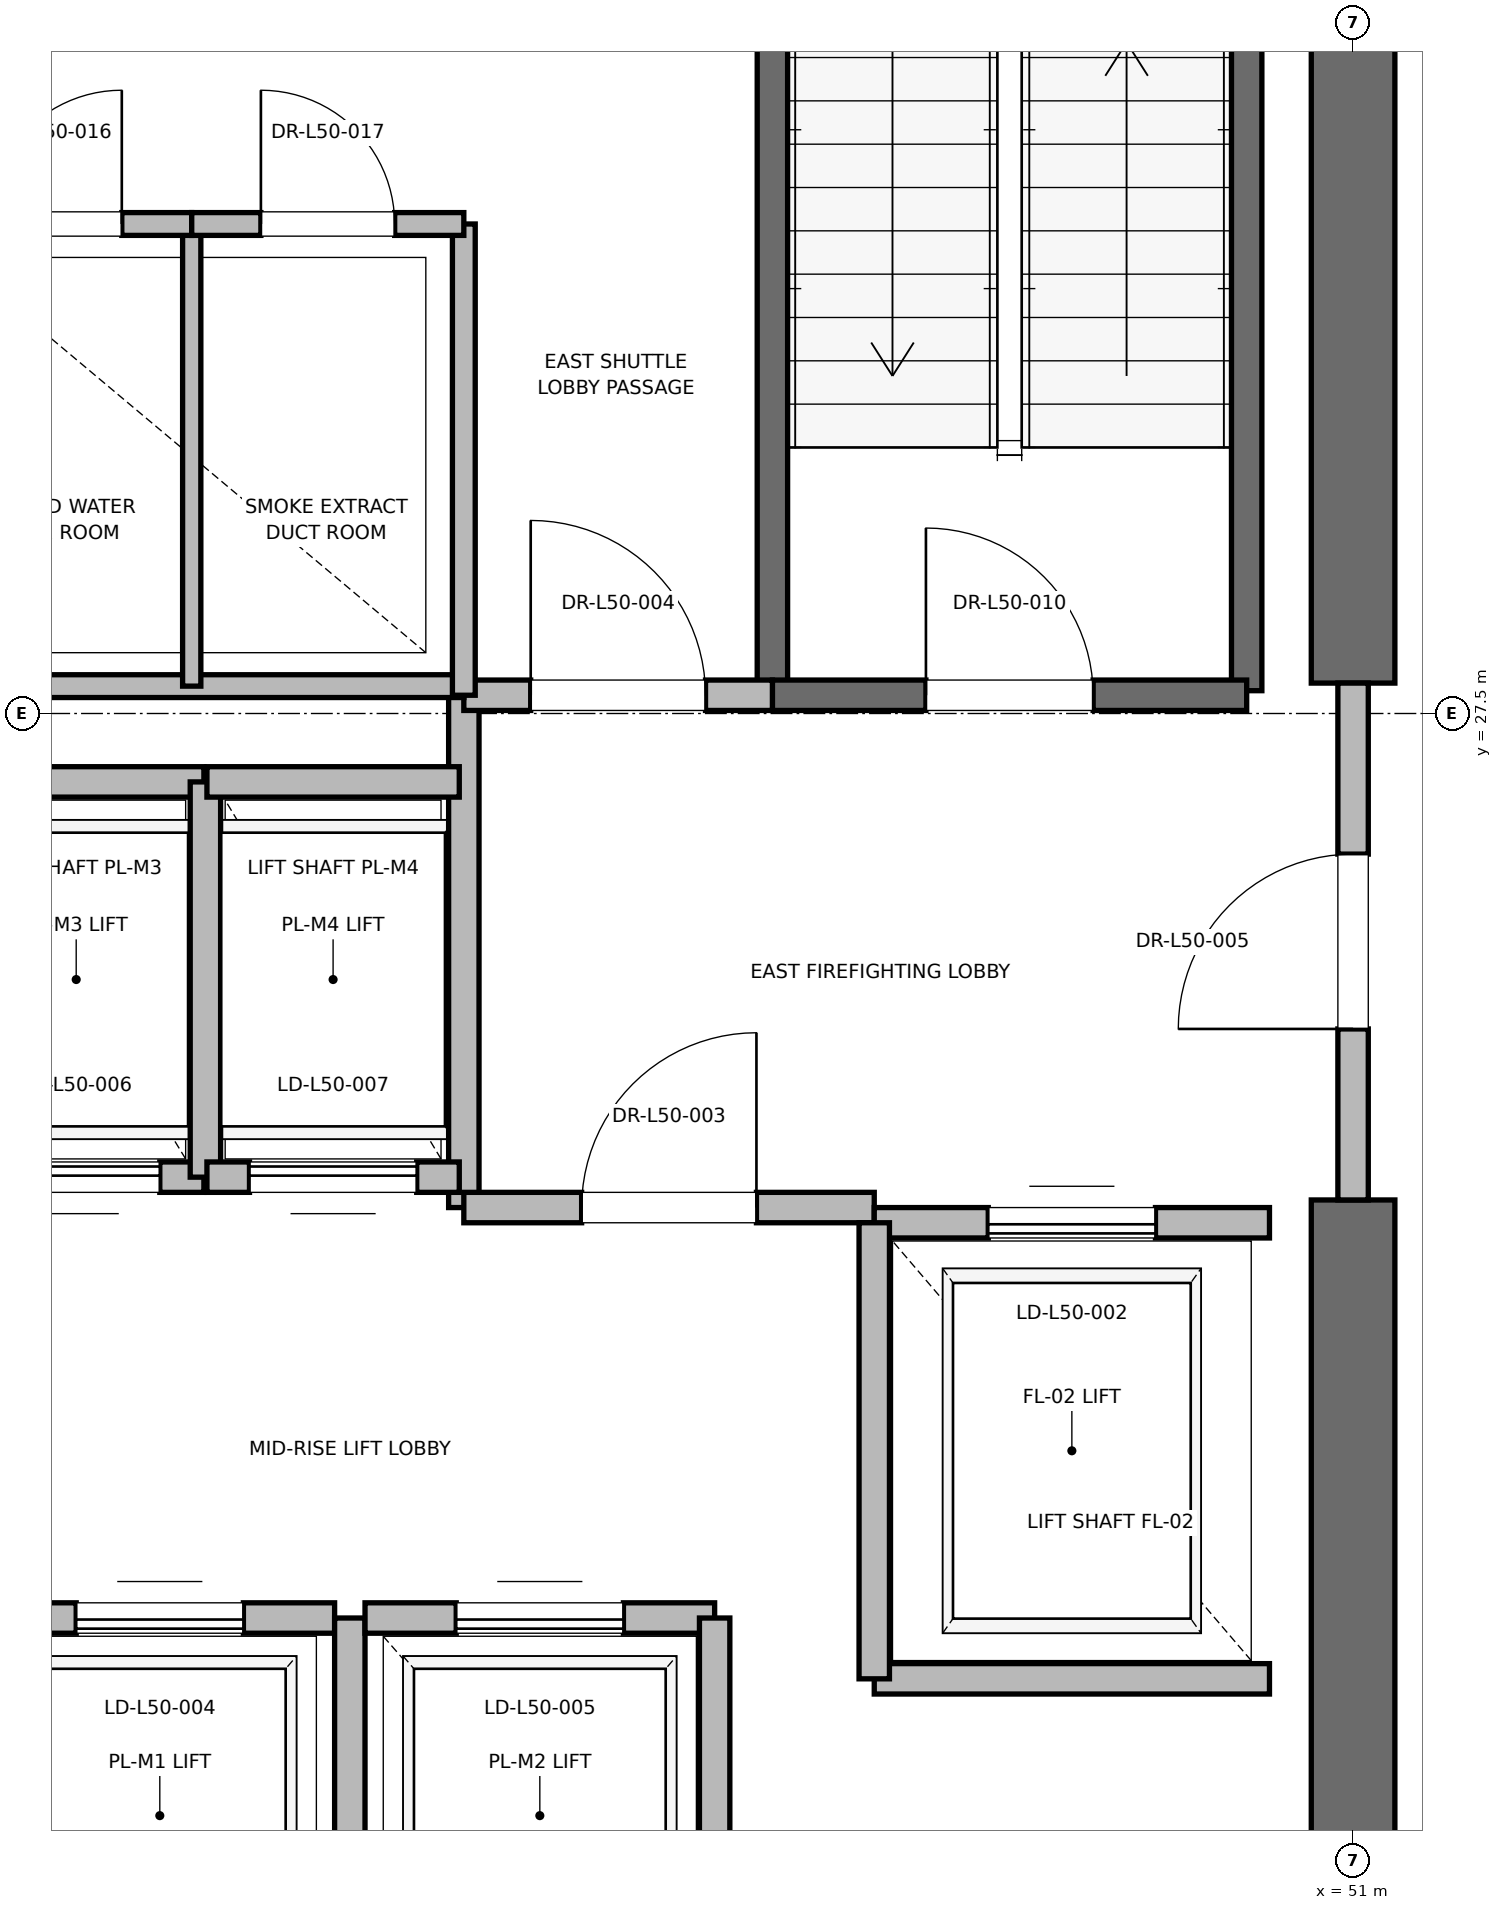
"""IFC4 building model, lengths in metres.
Left out: names, types, materials, properties, quantities, classifications, styles, units other than length and angle.
Written with IfcOpenShell. Run it as: python <this file> out.ifc"""

import sys

from ifc_helpers import new_model, si_unit, direction, frame, frame_2d, origin, place, context, subcontext, project, spatial, rectangle, extrude, element, fill, save


model = new_model("IFC4")
c1 = context("Model", 3, precision=1e-05, world=origin(), true_north=direction((0.0, 1.0)))
c2 = subcontext(c1, "Body", "Model", "MODEL_VIEW")
j1 = project(units=[si_unit("LENGTHUNIT", "METRE"), si_unit("PLANEANGLEUNIT", "RADIAN")], contexts=[c1])
p1 = place(None, origin())
s1 = spatial("IfcSite", under=j1, at=p1, CompositionType="ELEMENT")
p2 = place(p1, origin())
s2 = spatial("IfcBuilding", under=s1, at=p2, CompositionType="ELEMENT")
p3 = place(p2, frame((0.0, 0.0, 217.2)))
s3 = spatial("IfcBuildingStorey", under=s2, at=p3, CompositionType="ELEMENT", Elevation=217.2)
p4 = place(p3, frame((51.0, 18.5, 0.0), z_axis=(0.0, 0.0, 1.0), x_axis=(0.0, 1.0, 0.0)))
e1 = element("IfcWall", 1, at=p4, inside=s3, PredefinedType="SHEAR", context=c2, shape_type="SweptSolid", body=[
    extrude(rectangle(XDim=5.8, YDim=0.55, at=frame_2d((2.9, 0.0))), origin(), (0.0, 0.0, 1.0), 3.775),
])
p5 = place(p3, frame((51.0, 27.7, 0.0), z_axis=(0.0, 0.0, 1.0), x_axis=(0.0, 1.0, 0.0)))
e2 = element("IfcWall", 2, at=p5, inside=s3, PredefinedType="SHEAR", context=c2, shape_type="SweptSolid", body=[
    extrude(rectangle(XDim=8.8, YDim=0.55, at=frame_2d((4.4, 0.0))), origin(), (0.0, 0.0, 1.0), 3.775),
])
p6 = place(p3, frame((50.3, 27.65, 0.0), z_axis=(0.0, 0.0, 1.0), x_axis=(0.0, 1.0, 0.0)))
e3 = element("IfcWall", 3, at=p6, inside=s3, PredefinedType="SOLIDWALL", context=c2, shape_type="SweptSolid", body=[
    extrude(rectangle(XDim=8.15, YDim=0.2, at=frame_2d((4.075, 0.0))), origin(), (0.0, 0.0, 1.0), 3.775),
])
p7 = place(p3, frame((47.18, 27.62, 0.0), z_axis=(0.0, 0.0, 1.0), x_axis=(0.0, 1.0, 0.0)))
e4 = element("IfcWall", 4, at=p7, inside=s3, PredefinedType="SOLIDWALL", context=c2, shape_type="SweptSolid", body=[
    extrude(rectangle(XDim=8.18, YDim=0.2, at=frame_2d((4.09, 0.0))), origin(), (0.0, 0.0, 1.0), 3.775),
])
p8 = place(p3, frame((47.18, 27.62, 0.0), z_axis=(0.0, 0.0, 1.0), x_axis=(1.0, 0.0, 0.0)))
e5 = element("IfcWall", 5, at=p8, inside=s3, PredefinedType="SOLIDWALL", context=c2, shape_type="SweptSolid", body=[
    extrude(rectangle(XDim=3.12, YDim=0.2, at=frame_2d((1.56, 0.0))), origin(), (0.0, 0.0, 1.0), 3.775),
])
p9 = place(p8, frame((1.01, 0.0, 0.0)))
e6 = element("IfcOpeningElement", 6, at=p9, cuts=e5, PredefinedType="OPENING", context=c2, shape_type="SweptSolid", body=[
    extrude(rectangle(XDim=1.1, YDim=2.15, at=frame_2d((0.55, 1.075))), frame((0.0, 0.1, 0.0), z_axis=(0.0, -1.0, 0.0), x_axis=(1.0, 0.0, 0.0)), (0.0, 0.0, 1.0), 0.2),
])
p10 = place(p3, frame((45.15, 24.25, 0.0), z_axis=(0.0, 0.0, 1.0), x_axis=(0.0, 1.0, 0.0)))
e7 = element("IfcWall", 7, at=p10, inside=s3, PredefinedType="PARTITIONING", context=c2, shape_type="SweptSolid", body=[
    extrude(rectangle(XDim=3.37, YDim=0.2, at=frame_2d((1.685, 0.0))), origin(), (0.0, 0.0, 1.0), 3.775),
])
p11 = place(p3, frame((45.15, 24.25, 0.0), z_axis=(0.0, 0.0, 1.0), x_axis=(1.0, 0.0, 0.0)))
e8 = element("IfcWall", 8, at=p11, inside=s3, PredefinedType="PARTITIONING", context=c2, shape_type="SweptSolid", body=[
    extrude(rectangle(XDim=2.7, YDim=0.2, at=frame_2d((1.35, 0.0))), origin(), (0.0, 0.0, 1.0), 3.775),
])
p12 = place(p11, frame((0.775, 0.0, 0.0)))
e9 = element("IfcOpeningElement", 9, at=p12, cuts=e8, PredefinedType="OPENING", context=c2, shape_type="SweptSolid", body=[
    extrude(rectangle(XDim=1.15, YDim=2.2, at=frame_2d((0.575, 1.1))), frame((0.0, 0.1, 0.0), z_axis=(0.0, -1.0, 0.0), x_axis=(1.0, 0.0, 0.0)), (0.0, 0.0, 1.0), 0.2),
])
p13 = place(p3, frame((45.15, 27.62, 0.0), z_axis=(0.0, 0.0, 1.0), x_axis=(1.0, 0.0, 0.0)))
e10 = element("IfcWall", 10, at=p13, inside=s3, PredefinedType="PARTITIONING", context=c2, shape_type="SweptSolid", body=[
    extrude(rectangle(XDim=2.03, YDim=0.2, at=frame_2d((1.015, 0.0))), origin(), (0.0, 0.0, 1.0), 3.775),
])
p14 = place(p13, frame((0.44, 0.0, 0.0)))
e11 = element("IfcOpeningElement", 11, at=p14, cuts=e10, PredefinedType="OPENING", context=c2, shape_type="SweptSolid", body=[
    extrude(rectangle(XDim=1.15, YDim=2.2, at=frame_2d((0.575, 1.1))), frame((0.0, 0.1, 0.0), z_axis=(0.0, -1.0, 0.0), x_axis=(1.0, 0.0, 0.0)), (0.0, 0.0, 1.0), 0.2),
])
p15 = place(p3, frame((51.0, 24.3, 0.0), z_axis=(0.0, 0.0, 1.0), x_axis=(0.0, 1.0, 0.0)))
e12 = element("IfcWall", 12, at=p15, inside=s3, PredefinedType="PARTITIONING", context=c2, shape_type="SweptSolid", body=[
    extrude(rectangle(XDim=3.4, YDim=0.2, at=frame_2d((1.7, 0.0))), origin(), (0.0, 0.0, 1.0), 2.755),
])
p16 = place(p15, frame((1.125, 0.0, 0.0)))
e13 = element("IfcOpeningElement", 13, at=p16, cuts=e12, PredefinedType="OPENING", context=c2, shape_type="SweptSolid", body=[
    extrude(rectangle(XDim=1.15, YDim=2.2, at=frame_2d((0.575, 1.1))), frame((0.0, 0.1, 0.0), z_axis=(0.0, -1.0, 0.0), x_axis=(1.0, 0.0, 0.0)), (0.0, 0.0, 1.0), 0.2),
])
p17 = place(p3, frame((47.85, 21.15, 0.0), z_axis=(0.0, 0.0, 1.0), x_axis=(1.0, 0.0, 0.0)))
e14 = element("IfcWall", 14, at=p17, inside=s3, PredefinedType="SOLIDWALL", context=c2, shape_type="SweptSolid", body=[
    extrude(rectangle(XDim=2.6, YDim=0.2, at=frame_2d((1.3, 0.0))), origin(), (0.0, 0.0, 1.0), 3.775),
])
p18 = place(p3, frame((50.45, 24.15, 0.0), z_axis=(0.0, 0.0, 1.0), x_axis=(-1.0, 0.0, 0.0)))
e15 = element("IfcWall", 15, at=p18, inside=s3, PredefinedType="SOLIDWALL", context=c2, shape_type="SweptSolid", body=[
    extrude(rectangle(XDim=2.6, YDim=0.2, at=frame_2d((1.3, 0.0))), origin(), (0.0, 0.0, 1.0), 2.755),
])
p19 = place(p18, frame((0.75, 0.0, 0.0)))
e16 = element("IfcOpeningElement", 16, at=p19, cuts=e15, PredefinedType="OPENING", context=c2, shape_type="SweptSolid", body=[
    extrude(rectangle(XDim=1.1, YDim=2.2, at=frame_2d((0.55, 1.1))), frame((0.0, 0.1, 0.0), z_axis=(0.0, -1.0, 0.0), x_axis=(1.0, 0.0, 0.0)), (0.0, 0.0, 1.0), 0.2),
])
p20 = place(p3, frame((47.85, 24.15, 0.0), z_axis=(0.0, 0.0, 1.0), x_axis=(0.0, -1.0, 0.0)))
e17 = element("IfcWall", 17, at=p20, inside=s3, PredefinedType="SOLIDWALL", context=c2, shape_type="SweptSolid", body=[
    extrude(rectangle(XDim=3.0, YDim=0.2, at=frame_2d((1.5, 0.0))), origin(), (0.0, 0.0, 1.0), 3.775),
])
p21 = place(p3, frame((44.3, 21.55, 0.0), z_axis=(0.0, 0.0, 1.0), x_axis=(-1.0, 0.0, 0.0)))
e18 = element("IfcWall", 18, at=p21, inside=s3, PredefinedType="SOLIDWALL", context=c2, shape_type="SweptSolid", body=[
    extrude(rectangle(XDim=2.3, YDim=0.2, at=frame_2d((1.15, 0.0))), origin(), (0.0, 0.0, 1.0), 3.775),
])
p22 = place(p21, frame((0.6, 0.0, 0.0)))
e19 = element("IfcOpeningElement", 19, at=p22, cuts=e18, PredefinedType="OPENING", context=c2, shape_type="SweptSolid", body=[
    extrude(rectangle(XDim=1.1, YDim=2.2, at=frame_2d((0.55, 1.1))), frame((0.0, 0.1, 0.0), z_axis=(0.0, -1.0, 0.0), x_axis=(1.0, 0.0, 0.0)), (0.0, 0.0, 1.0), 0.2),
])
p23 = place(p3, frame((44.4, 18.95, 0.0), z_axis=(0.0, 0.0, 1.0), x_axis=(0.0, 1.0, 0.0)))
e20 = element("IfcWall", 20, at=p23, inside=s3, PredefinedType="SOLIDWALL", context=c2, shape_type="SweptSolid", body=[
    extrude(rectangle(XDim=2.6, YDim=0.2, at=frame_2d((1.3, 0.0))), origin(), (0.0, 0.0, 1.0), 3.775),
])
p24 = place(p3, frame((46.8, 21.55, 0.0), z_axis=(0.0, 0.0, 1.0), x_axis=(-1.0, 0.0, 0.0)))
e21 = element("IfcWall", 21, at=p24, inside=s3, PredefinedType="SOLIDWALL", context=c2, shape_type="SweptSolid", body=[
    extrude(rectangle(XDim=2.3, YDim=0.2, at=frame_2d((1.15, 0.0))), origin(), (0.0, 0.0, 1.0), 3.775),
])
p25 = place(p24, frame((0.6, 0.0, 0.0)))
e22 = element("IfcOpeningElement", 22, at=p25, cuts=e21, PredefinedType="OPENING", context=c2, shape_type="SweptSolid", body=[
    extrude(rectangle(XDim=1.1, YDim=2.2, at=frame_2d((0.55, 1.1))), frame((0.0, 0.1, 0.0), z_axis=(0.0, -1.0, 0.0), x_axis=(1.0, 0.0, 0.0)), (0.0, 0.0, 1.0), 0.2),
])
p26 = place(p3, frame((46.8, 18.95, 0.0), z_axis=(0.0, 0.0, 1.0), x_axis=(0.0, 1.0, 0.0)))
e23 = element("IfcWall", 23, at=p26, inside=s3, PredefinedType="SOLIDWALL", context=c2, shape_type="SweptSolid", body=[
    extrude(rectangle(XDim=2.6, YDim=0.2, at=frame_2d((1.3, 0.0))), origin(), (0.0, 0.0, 1.0), 3.775),
])
p27 = place(p3, frame((41.76, 24.45, 0.0), z_axis=(0.0, 0.0, 1.0), x_axis=(1.0, 0.0, 0.0)))
e24 = element("IfcWall", 24, at=p27, inside=s3, PredefinedType="SOLIDWALL", context=c2, shape_type="SweptSolid", body=[
    extrude(rectangle(XDim=1.68, YDim=0.2, at=frame_2d((0.84, 0.0))), origin(), (0.0, 0.0, 1.0), 3.775),
])
p28 = place(p27, frame((0.29, 0.0, 0.0)))
e25 = element("IfcOpeningElement", 25, at=p28, cuts=e24, PredefinedType="OPENING", context=c2, shape_type="SweptSolid", body=[
    extrude(rectangle(XDim=1.1, YDim=2.2, at=frame_2d((0.55, 1.1))), frame((0.0, 0.1, 0.0), z_axis=(0.0, -1.0, 0.0), x_axis=(1.0, 0.0, 0.0)), (0.0, 0.0, 1.0), 0.2),
])
p29 = place(p3, frame((43.44, 27.05, 0.0), z_axis=(0.0, 0.0, 1.0), x_axis=(-1.0, 0.0, 0.0)))
e26 = element("IfcWall", 26, at=p29, inside=s3, PredefinedType="SOLIDWALL", context=c2, shape_type="SweptSolid", body=[
    extrude(rectangle(XDim=1.68, YDim=0.2, at=frame_2d((0.84, 0.0))), origin(), (0.0, 0.0, 1.0), 3.775),
])
p30 = place(p3, frame((43.45, 24.45, 0.0), z_axis=(0.0, 0.0, 1.0), x_axis=(0.0, 1.0, 0.0)))
e27 = element("IfcWall", 27, at=p30, inside=s3, PredefinedType="SOLIDWALL", context=c2, shape_type="SweptSolid", body=[
    extrude(rectangle(XDim=2.6, YDim=0.2, at=frame_2d((1.3, 0.0))), origin(), (0.0, 0.0, 1.0), 3.775),
])
p31 = place(p3, frame((43.46, 24.45, 0.0), z_axis=(0.0, 0.0, 1.0), x_axis=(1.0, 0.0, 0.0)))
e28 = element("IfcWall", 28, at=p31, inside=s3, PredefinedType="SOLIDWALL", context=c2, shape_type="SweptSolid", body=[
    extrude(rectangle(XDim=1.66, YDim=0.2, at=frame_2d((0.83, 0.0))), origin(), (0.0, 0.0, 1.0), 3.775),
])
p32 = place(p31, frame((0.28, 0.0, 0.0)))
e29 = element("IfcOpeningElement", 29, at=p32, cuts=e28, PredefinedType="OPENING", context=c2, shape_type="SweptSolid", body=[
    extrude(rectangle(XDim=1.1, YDim=2.2, at=frame_2d((0.55, 1.1))), frame((0.0, 0.1, 0.0), z_axis=(0.0, -1.0, 0.0), x_axis=(1.0, 0.0, 0.0)), (0.0, 0.0, 1.0), 0.2),
])
p33 = place(p3, frame((45.12, 27.05, 0.0), z_axis=(0.0, 0.0, 1.0), x_axis=(-1.0, 0.0, 0.0)))
e30 = element("IfcWall", 30, at=p33, inside=s3, PredefinedType="SOLIDWALL", context=c2, shape_type="SweptSolid", body=[
    extrude(rectangle(XDim=1.66, YDim=0.2, at=frame_2d((0.83, 0.0))), origin(), (0.0, 0.0, 1.0), 3.775),
])
p34 = place(p3, frame((41.56, 27.68, 0.0), z_axis=(0.0, 0.0, 1.0), x_axis=(1.0, 0.0, 0.0)))
e31 = element("IfcWall", 31, at=p34, inside=s3, PredefinedType="PARTITIONING", context=c2, shape_type="SweptSolid", body=[
    extrude(rectangle(XDim=3.59, YDim=0.15, at=frame_2d((1.795, 0.0))), origin(), (0.0, 0.0, 1.0), 2.85),
])
p35 = place(p3, frame((45.15, 27.62, 0.0), z_axis=(0.0, 0.0, 1.0), x_axis=(0.0, 1.0, 0.0)))
e32 = element("IfcWall", 32, at=p35, inside=s3, PredefinedType="PARTITIONING", context=c2, shape_type="SweptSolid", body=[
    extrude(rectangle(XDim=3.1, YDim=0.15, at=frame_2d((1.55, 0.0))), origin(), (0.0, 0.0, 1.0), 2.85),
])
p36 = place(p3, frame((43.36, 27.68, 0.0), z_axis=(0.0, 0.0, 1.0), x_axis=(0.0, 1.0, 0.0)))
e33 = element("IfcWall", 33, at=p36, inside=s3, PredefinedType="PARTITIONING", context=c2, shape_type="SweptSolid", body=[
    extrude(rectangle(XDim=3.04, YDim=0.12, at=frame_2d((1.52, 0.0))), origin(), (0.0, 0.0, 1.0), 2.85),
])
p37 = place(p3, frame((41.56, 30.72, 0.0), z_axis=(0.0, 0.0, 1.0), x_axis=(1.0, 0.0, 0.0)))
e34 = element("IfcWall", 34, at=p37, inside=s3, PredefinedType="PARTITIONING", context=c2, shape_type="SweptSolid", body=[
    extrude(rectangle(XDim=1.8, YDim=0.15, at=frame_2d((0.9, 0.0))), origin(), (0.0, 0.0, 1.0), 2.85),
])
p38 = place(p37, frame((0.46, 0.0, 0.0)))
e35 = element("IfcOpeningElement", 35, at=p38, cuts=e34, PredefinedType="OPENING", context=c2, shape_type="SweptSolid", body=[
    extrude(rectangle(XDim=0.88, YDim=2.1, at=frame_2d((0.44, 1.05))), frame((0.0, 0.075, 0.0), z_axis=(0.0, -1.0, 0.0), x_axis=(1.0, 0.0, 0.0)), (0.0, 0.0, 1.0), 0.15),
])
p39 = place(p3, frame((43.36, 30.72, 0.0), z_axis=(0.0, 0.0, 1.0), x_axis=(1.0, 0.0, 0.0)))
e36 = element("IfcWall", 36, at=p39, inside=s3, PredefinedType="PARTITIONING", context=c2, shape_type="SweptSolid", body=[
    extrude(rectangle(XDim=1.79, YDim=0.15, at=frame_2d((0.895, 0.0))), origin(), (0.0, 0.0, 1.0), 2.85),
])
p40 = place(p39, frame((0.455, 0.0, 0.0)))
e37 = element("IfcOpeningElement", 37, at=p40, cuts=e36, PredefinedType="OPENING", context=c2, shape_type="SweptSolid", body=[
    extrude(rectangle(XDim=0.88, YDim=2.1, at=frame_2d((0.44, 1.05))), frame((0.0, 0.075, 0.0), z_axis=(0.0, -1.0, 0.0), x_axis=(1.0, 0.0, 0.0)), (0.0, 0.0, 1.0), 0.15),
])
p41 = place(p9, origin())
e38 = element("IfcDoor", 38, at=p41, inside=s3, OperationType="SINGLE_SWING_LEFT", PredefinedType="DOOR", context=c2, shape_type="SweptSolid", body=[
    extrude(rectangle(XDim=1.1, YDim=2.15, at=frame_2d((0.55, 1.075))), frame((0.0, 0.025, 0.0), z_axis=(0.0, -1.0, 0.0), x_axis=(1.0, 0.0, 0.0)), (0.0, 0.0, 1.0), 0.05),
])
fill(e6, e38)
p42 = place(p12, origin())
e39 = element("IfcDoor", 39, at=p42, inside=s3, OperationType="SINGLE_SWING_RIGHT", PredefinedType="DOOR", context=c2, shape_type="SweptSolid", body=[
    extrude(rectangle(XDim=1.15, YDim=2.2, at=frame_2d((0.575, 1.1))), frame((0.0, 0.025, 0.0), z_axis=(0.0, -1.0, 0.0), x_axis=(1.0, 0.0, 0.0)), (0.0, 0.0, 1.0), 0.05),
])
fill(e9, e39)
p43 = place(p14, origin())
e40 = element("IfcDoor", 40, at=p43, inside=s3, OperationType="SINGLE_SWING_LEFT", PredefinedType="DOOR", context=c2, shape_type="SweptSolid", body=[
    extrude(rectangle(XDim=1.15, YDim=2.2, at=frame_2d((0.575, 1.1))), frame((0.0, 0.025, 0.0), z_axis=(0.0, -1.0, 0.0), x_axis=(1.0, 0.0, 0.0)), (0.0, 0.0, 1.0), 0.05),
])
fill(e11, e40)
p44 = place(p16, origin())
e41 = element("IfcDoor", 41, at=p44, inside=s3, OperationType="SINGLE_SWING_LEFT", PredefinedType="DOOR", context=c2, shape_type="SweptSolid", body=[
    extrude(rectangle(XDim=1.15, YDim=2.2, at=frame_2d((0.575, 1.1))), frame((0.0, 0.025, 0.0), z_axis=(0.0, -1.0, 0.0), x_axis=(1.0, 0.0, 0.0)), (0.0, 0.0, 1.0), 0.05),
])
fill(e13, e41)
p45 = place(p19, origin())
e42 = element("IfcDoor", 42, at=p45, inside=s3, OperationType="SLIDING_TO_RIGHT", PredefinedType="DOOR", context=c2, shape_type="SweptSolid", body=[
    extrude(rectangle(XDim=1.1, YDim=2.2, at=frame_2d((0.55, 1.1))), frame((0.0, 0.025, 0.0), z_axis=(0.0, -1.0, 0.0), x_axis=(1.0, 0.0, 0.0)), (0.0, 0.0, 1.0), 0.05),
])
fill(e16, e42)
p46 = place(p22, origin())
e43 = element("IfcDoor", 43, at=p46, inside=s3, OperationType="SLIDING_TO_RIGHT", PredefinedType="DOOR", context=c2, shape_type="SweptSolid", body=[
    extrude(rectangle(XDim=1.1, YDim=2.2, at=frame_2d((0.55, 1.1))), frame((0.0, 0.025, 0.0), z_axis=(0.0, -1.0, 0.0), x_axis=(1.0, 0.0, 0.0)), (0.0, 0.0, 1.0), 0.05),
])
fill(e19, e43)
p47 = place(p25, origin())
e44 = element("IfcDoor", 44, at=p47, inside=s3, OperationType="SLIDING_TO_RIGHT", PredefinedType="DOOR", context=c2, shape_type="SweptSolid", body=[
    extrude(rectangle(XDim=1.1, YDim=2.2, at=frame_2d((0.55, 1.1))), frame((0.0, 0.025, 0.0), z_axis=(0.0, -1.0, 0.0), x_axis=(1.0, 0.0, 0.0)), (0.0, 0.0, 1.0), 0.05),
])
fill(e22, e44)
p48 = place(p28, origin())
e45 = element("IfcDoor", 45, at=p48, inside=s3, OperationType="SLIDING_TO_RIGHT", PredefinedType="DOOR", context=c2, shape_type="SweptSolid", body=[
    extrude(rectangle(XDim=1.1, YDim=2.2, at=frame_2d((0.55, 1.1))), frame((0.0, 0.025, 0.0), z_axis=(0.0, -1.0, 0.0), x_axis=(1.0, 0.0, 0.0)), (0.0, 0.0, 1.0), 0.05),
])
fill(e25, e45)
p49 = place(p32, origin())
e46 = element("IfcDoor", 46, at=p49, inside=s3, OperationType="SLIDING_TO_RIGHT", PredefinedType="DOOR", context=c2, shape_type="SweptSolid", body=[
    extrude(rectangle(XDim=1.1, YDim=2.2, at=frame_2d((0.55, 1.1))), frame((0.0, 0.025, 0.0), z_axis=(0.0, -1.0, 0.0), x_axis=(1.0, 0.0, 0.0)), (0.0, 0.0, 1.0), 0.05),
])
fill(e29, e46)
p50 = place(p38, origin())
e47 = element("IfcDoor", 47, at=p50, inside=s3, OperationType="SINGLE_SWING_RIGHT", PredefinedType="DOOR", context=c2, shape_type="SweptSolid", body=[
    extrude(rectangle(XDim=0.88, YDim=2.1, at=frame_2d((0.44, 1.05))), frame((0.0, 0.025, 0.0), z_axis=(0.0, -1.0, 0.0), x_axis=(1.0, 0.0, 0.0)), (0.0, 0.0, 1.0), 0.05),
])
fill(e35, e47)
p51 = place(p40, origin())
e48 = element("IfcDoor", 48, at=p51, inside=s3, OperationType="SINGLE_SWING_LEFT", PredefinedType="DOOR", context=c2, shape_type="SweptSolid", body=[
    extrude(rectangle(XDim=0.88, YDim=2.1, at=frame_2d((0.44, 1.05))), frame((0.0, 0.025, 0.0), z_axis=(0.0, -1.0, 0.0), x_axis=(1.0, 0.0, 0.0)), (0.0, 0.0, 1.0), 0.05),
])
fill(e37, e48)
save(model, sys.argv[1])
